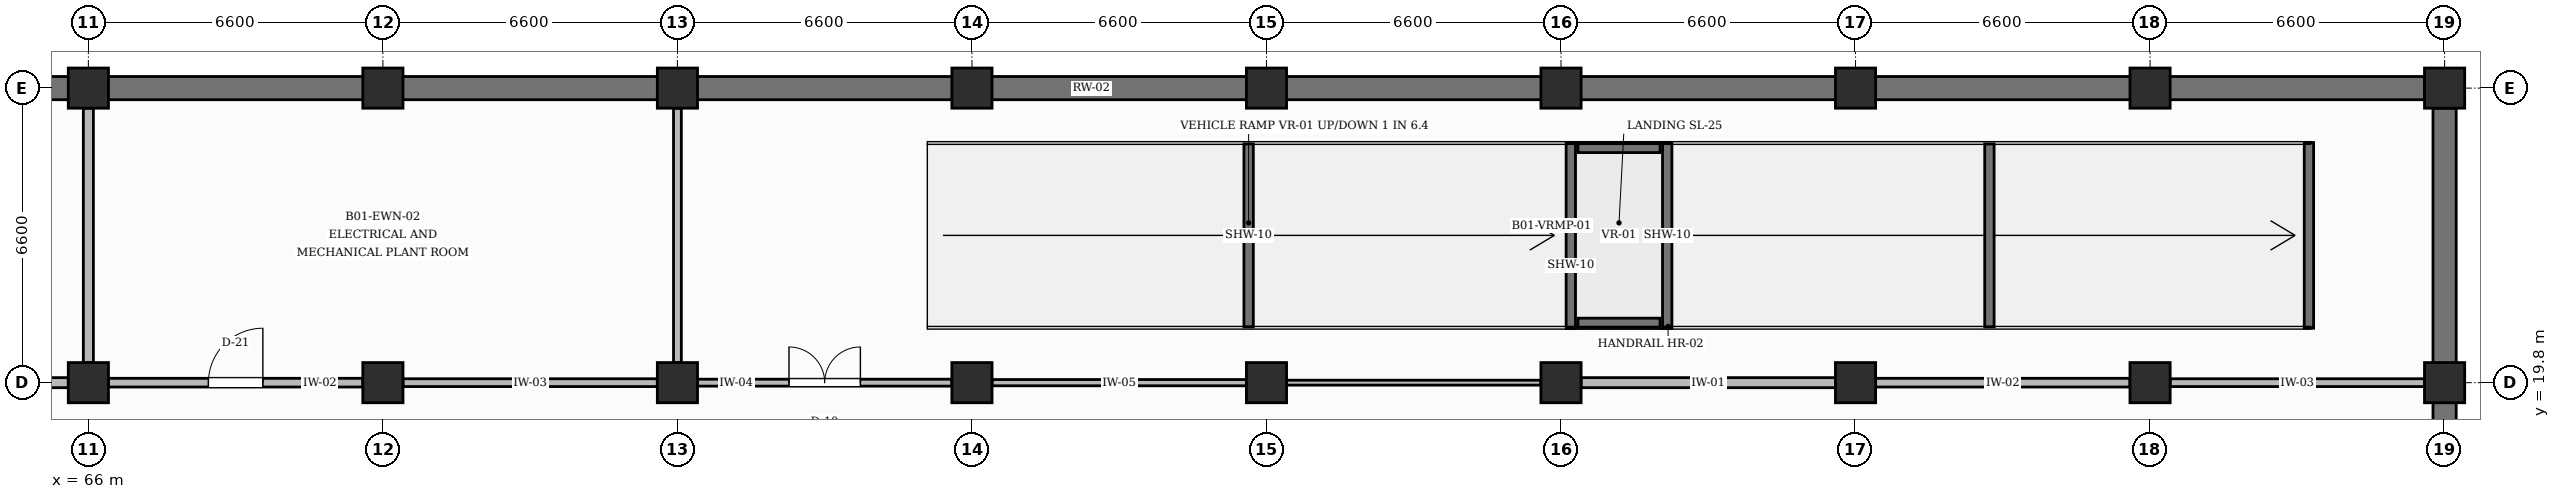
"""IFC4 building model, lengths in metres.
Left out: names, types, materials, properties, quantities, classifications, styles, units other than length and angle.
Written with IfcOpenShell. Run it as: python <this file> out.ifc"""

import sys

from ifc_helpers import new_model, si_unit, direction, frame, frame_2d, origin, origin_2d, place, context, subcontext, project, spatial, rectangle, extrude, element, fill, save


model = new_model("IFC4")
c1 = context("Model", 3, precision=1e-05, world=origin(), true_north=direction((0.0, 1.0)))
c2 = subcontext(c1, "Body", "Model", "MODEL_VIEW")
j1 = project(units=[si_unit("LENGTHUNIT", "METRE"), si_unit("PLANEANGLEUNIT", "RADIAN")], contexts=[c1])
p1 = place(None, origin())
s1 = spatial("IfcSite", under=j1, at=p1, CompositionType="ELEMENT")
p2 = place(p1, origin())
s2 = spatial("IfcBuilding", under=s1, at=p2, CompositionType="ELEMENT")
p3 = place(p2, frame((0.0, 0.0, -4.5)))
s3 = spatial("IfcBuildingStorey", under=s2, at=p3, CompositionType="ELEMENT", Elevation=-4.5)
for number, where, z_axis, x_axis in (
    (1, (66.0, 19.8, 0.0), (0.0, 0.0, 1.0), (1.0, 0.0, 0.0)),
    (2, (66.0, 26.4, 0.0), (0.0, 0.0, 1.0), (1.0, 0.0, 0.0)),
    (3, (72.6, 19.8, 0.0), (0.0, 0.0, 1.0), (1.0, 0.0, 0.0)),
    (4, (72.6, 26.4, 0.0), (0.0, 0.0, 1.0), (1.0, 0.0, 0.0)),
    (5, (79.2, 19.8, 0.0), (0.0, 0.0, 1.0), (1.0, 0.0, 0.0)),
    (6, (79.2, 26.4, 0.0), (0.0, 0.0, 1.0), (1.0, 0.0, 0.0)),
    (7, (85.8, 19.8, 0.0), (0.0, 0.0, 1.0), (1.0, 0.0, 0.0)),
    (8, (85.8, 26.4, 0.0), (0.0, 0.0, 1.0), (1.0, 0.0, 0.0)),
    (9, (92.4, 19.8, 0.0), (0.0, 0.0, 1.0), (1.0, 0.0, 0.0)),
    (10, (92.4, 26.4, 0.0), (0.0, 0.0, 1.0), (1.0, 0.0, 0.0)),
    (11, (99.0, 19.8, 0.0), (0.0, 0.0, 1.0), (1.0, 0.0, 0.0)),
    (12, (99.0, 26.4, 0.0), (0.0, 0.0, 1.0), (1.0, 0.0, 0.0)),
    (13, (105.6, 19.8, 0.0), (0.0, 0.0, 1.0), (1.0, 0.0, 0.0)),
    (14, (105.6, 26.4, 0.0), (0.0, 0.0, 1.0), (1.0, 0.0, 0.0)),
    (15, (112.2, 19.8, 0.0), (0.0, 0.0, 1.0), (1.0, 0.0, 0.0)),
    (16, (112.2, 26.4, 0.0), (0.0, 0.0, 1.0), (1.0, 0.0, 0.0)),
    (17, (118.8, 19.8, 0.0), (0.0, 0.0, 1.0), (1.0, 0.0, 0.0)),
    (18, (118.8, 26.4, 0.0), (0.0, 0.0, 1.0), (1.0, 0.0, 0.0)),
):
    element("IfcColumn", number, at=place(p3, frame(where, z_axis=z_axis, x_axis=x_axis)), inside=s3, PredefinedType="COLUMN", context=c2, shape_type="SweptSolid", body=[
        extrude(rectangle(XDim=0.9, YDim=0.9, at=origin_2d()), origin(), (0.0, 0.0, 1.0), 4.5),
    ])
for number, where, z_axis, x_axis in (
    (19, (99.22, 21.02, 0.0), (0.0, 0.0, 1.0), (0.0, 1.0, 0.0)),
    (20, (101.38, 21.02, 0.0), (0.0, 0.0, 1.0), (0.0, 1.0, 0.0)),
):
    element("IfcWall", number, at=place(p3, frame(where, z_axis=z_axis, x_axis=x_axis)), inside=s3, PredefinedType="SOLIDWALL", context=c2, shape_type="SweptSolid", body=[
        extrude(rectangle(XDim=4.16, YDim=0.21, at=frame_2d((2.08, 0.0))), origin(), (0.0, 0.0, 1.0), 2.065),
    ])
for number, where, z_axis, x_axis in (
    (21, (99.38, 21.14, 0.0), (0.0, 0.0, 1.0), (1.0, 0.0, 0.0)),
    (22, (99.38, 25.06, 0.0), (0.0, 0.0, 1.0), (1.0, 0.0, 0.0)),
):
    element("IfcWall", number, at=place(p3, frame(where, z_axis=z_axis, x_axis=x_axis)), inside=s3, PredefinedType="SOLIDWALL", context=c2, shape_type="SweptSolid", body=[
        extrude(rectangle(XDim=1.84, YDim=0.21, at=frame_2d((0.92, 0.0))), origin(), (0.0, 0.0, 1.0), 2.065),
    ])
p4 = place(p3, frame((92.0, 21.05, 0.0), z_axis=(0.0, 0.0, 1.0), x_axis=(0.0, 1.0, 0.0)))
e23 = element("IfcWall", 23, at=p4, inside=s3, PredefinedType="SOLIDWALL", context=c2, shape_type="SweptSolid", body=[
    extrude(rectangle(XDim=4.1, YDim=0.21, at=frame_2d((2.05, 0.0))), origin(), (0.0, 0.0, 1.0), 0.84),
])
p5 = place(p3, frame((108.6, 21.05, 0.0), z_axis=(0.0, 0.0, 1.0), x_axis=(0.0, 1.0, 0.0)))
e24 = element("IfcWall", 24, at=p5, inside=s3, PredefinedType="SOLIDWALL", context=c2, shape_type="SweptSolid", body=[
    extrude(rectangle(XDim=4.1, YDim=0.21, at=frame_2d((2.05, 0.0))), origin(), (0.0, 0.0, 1.0), 3.09),
])
p6 = place(p3, frame((115.76, 21.02, 0.0), z_axis=(0.0, 0.0, 1.0), x_axis=(0.0, 1.0, 0.0)))
e25 = element("IfcWall", 25, at=p6, inside=s3, PredefinedType="SOLIDWALL", context=c2, shape_type="SweptSolid", body=[
    extrude(rectangle(XDim=4.16, YDim=0.21, at=frame_2d((2.08, 0.0))), origin(), (0.0, 0.0, 1.0), 4.14),
])
for number, where, z_axis, x_axis in (
    (26, (59.85, 26.4, 0.0), (0.0, 0.0, 1.0), (1.0, 0.0, 0.0)),
    (27, (66.45, 26.4, 0.0), (0.0, 0.0, 1.0), (1.0, 0.0, 0.0)),
    (28, (73.05, 26.4, 0.0), (0.0, 0.0, 1.0), (1.0, 0.0, 0.0)),
):
    element("IfcWall", number, at=place(p3, frame(where, z_axis=z_axis, x_axis=x_axis)), inside=s3, PredefinedType="USERDEFINED", context=c2, shape_type="SweptSolid", body=[
        extrude(rectangle(XDim=5.7, YDim=0.52, at=frame_2d((2.85, 0.0))), origin(), (0.0, 0.0, 1.0), 3.49),
    ])
p7 = place(p3, frame((79.65, 26.4, 0.0), z_axis=(0.0, 0.0, 1.0), x_axis=(1.0, 0.0, 0.0)))
e29 = element("IfcWall", 29, at=p7, inside=s3, PredefinedType="USERDEFINED", context=c2, shape_type="SweptSolid", body=[
    extrude(rectangle(XDim=5.7, YDim=0.52, at=frame_2d((2.85, 0.0))), origin(), (0.0, 0.0, 1.0), 3.49),
])
for number, where, z_axis, x_axis in (
    (30, (86.25, 26.4, 0.0), (0.0, 0.0, 1.0), (1.0, 0.0, 0.0)),
    (31, (92.85, 26.4, 0.0), (0.0, 0.0, 1.0), (1.0, 0.0, 0.0)),
    (32, (99.45, 26.4, 0.0), (0.0, 0.0, 1.0), (1.0, 0.0, 0.0)),
    (33, (106.05, 26.4, 0.0), (0.0, 0.0, 1.0), (1.0, 0.0, 0.0)),
):
    element("IfcWall", number, at=place(p3, frame(where, z_axis=z_axis, x_axis=x_axis)), inside=s3, PredefinedType="USERDEFINED", context=c2, shape_type="SweptSolid", body=[
        extrude(rectangle(XDim=5.7, YDim=0.52, at=frame_2d((2.85, 0.0))), origin(), (0.0, 0.0, 1.0), 3.49),
    ])
for number, where, z_axis, x_axis in (
    (34, (118.8, 13.65, 0.0), (0.0, 0.0, 1.0), (0.0, 1.0, 0.0)),
    (35, (112.65, 26.4, 0.0), (0.0, 0.0, 1.0), (1.0, 0.0, 0.0)),
):
    element("IfcWall", number, at=place(p3, frame(where, z_axis=z_axis, x_axis=x_axis)), inside=s3, PredefinedType="USERDEFINED", context=c2, shape_type="SweptSolid", body=[
        extrude(rectangle(XDim=5.7, YDim=0.52, at=frame_2d((2.85, 0.0))), origin(), (0.0, 0.0, 1.0), 3.49),
    ])
p8 = place(p3, frame((118.8, 20.25, 0.0), z_axis=(0.0, 0.0, 1.0), x_axis=(0.0, 1.0, 0.0)))
e36 = element("IfcWall", 36, at=p8, inside=s3, PredefinedType="USERDEFINED", context=c2, shape_type="SweptSolid", body=[
    extrude(rectangle(XDim=5.7, YDim=0.52, at=frame_2d((2.85, 0.0))), origin(), (0.0, 0.0, 1.0), 3.49),
])
p9 = place(p3, frame((59.85, 19.8, 0.0), z_axis=(0.0, 0.0, 1.0), x_axis=(1.0, 0.0, 0.0)))
e37 = element("IfcWall", 37, at=p9, inside=s3, PredefinedType="PARTITIONING", context=c2, shape_type="SweptSolid", body=[
    extrude(rectangle(XDim=5.7, YDim=0.225, at=frame_2d((2.85, 0.0))), origin(), (0.0, 0.0, 1.0), 3.24),
])
p10 = place(p3, frame((66.0, 20.25, 0.0), z_axis=(0.0, 0.0, 1.0), x_axis=(0.0, 1.0, 0.0)))
e38 = element("IfcWall", 38, at=p10, inside=s3, PredefinedType="PARTITIONING", context=c2, shape_type="SweptSolid", body=[
    extrude(rectangle(XDim=5.7, YDim=0.225, at=frame_2d((2.85, 0.0))), origin(), (0.0, 0.0, 1.0), 3.34),
])
p11 = place(p3, frame((66.45, 19.8, 0.0), z_axis=(0.0, 0.0, 1.0), x_axis=(1.0, 0.0, 0.0)))
e39 = element("IfcWall", 39, at=p11, inside=s3, PredefinedType="PARTITIONING", context=c2, shape_type="SweptSolid", body=[
    extrude(rectangle(XDim=5.7, YDim=0.195, at=frame_2d((2.85, 0.0))), origin(), (0.0, 0.0, 1.0), 3.34),
])
p12 = place(p11, frame((2.24, 0.0, 0.0)))
e40 = element("IfcOpeningElement", 40, at=p12, cuts=e39, PredefinedType="OPENING", context=c2, shape_type="SweptSolid", body=[
    extrude(rectangle(XDim=1.22, YDim=2.15, at=frame_2d((0.61, 1.075))), frame((0.0, 0.107, 0.0), z_axis=(0.0, -1.0, 0.0), x_axis=(1.0, 0.0, 0.0)), (0.0, 0.0, 1.0), 0.215),
])
p13 = place(p3, frame((73.05, 19.8, 0.0), z_axis=(0.0, 0.0, 1.0), x_axis=(1.0, 0.0, 0.0)))
e41 = element("IfcWall", 41, at=p13, inside=s3, PredefinedType="PARTITIONING", context=c2, shape_type="SweptSolid", body=[
    extrude(rectangle(XDim=5.7, YDim=0.175, at=frame_2d((2.85, 0.0))), origin(), (0.0, 0.0, 1.0), 3.24),
])
p14 = place(p3, frame((79.2, 20.25, 0.0), z_axis=(0.0, 0.0, 1.0), x_axis=(0.0, 1.0, 0.0)))
e42 = element("IfcWall", 42, at=p14, inside=s3, PredefinedType="PARTITIONING", context=c2, shape_type="SweptSolid", body=[
    extrude(rectangle(XDim=5.7, YDim=0.175, at=frame_2d((2.85, 0.0))), origin(), (0.0, 0.0, 1.0), 3.34),
])
p15 = place(p3, frame((79.65, 19.8, 0.0), z_axis=(0.0, 0.0, 1.0), x_axis=(1.0, 0.0, 0.0)))
e43 = element("IfcWall", 43, at=p15, inside=s3, PredefinedType="PARTITIONING", context=c2, shape_type="SweptSolid", body=[
    extrude(rectangle(XDim=5.7, YDim=0.155, at=frame_2d((2.85, 0.0))), origin(), (0.0, 0.0, 1.0), 3.34),
])
p16 = place(p15, frame((2.05, 0.0, 0.0)))
e44 = element("IfcOpeningElement", 44, at=p16, cuts=e43, PredefinedType="OPENING", context=c2, shape_type="SweptSolid", body=[
    extrude(rectangle(XDim=1.6, YDim=2.2, at=frame_2d((0.8, 1.1))), frame((0.0, 0.087, 0.0), z_axis=(0.0, -1.0, 0.0), x_axis=(1.0, 0.0, 0.0)), (0.0, 0.0, 1.0), 0.175),
])
p17 = place(p3, frame((86.25, 19.8, 0.0), z_axis=(0.0, 0.0, 1.0), x_axis=(1.0, 0.0, 0.0)))
e45 = element("IfcWall", 45, at=p17, inside=s3, PredefinedType="PARTITIONING", context=c2, shape_type="SweptSolid", body=[
    extrude(rectangle(XDim=5.7, YDim=0.14, at=frame_2d((2.85, 0.0))), origin(), (0.0, 0.0, 1.0), 3.24),
])
p18 = place(p3, frame((92.85, 19.8, 0.0), z_axis=(0.0, 0.0, 1.0), x_axis=(1.0, 0.0, 0.0)))
e46 = element("IfcWall", 46, at=p18, inside=s3, PredefinedType="PARTITIONING", context=c2, shape_type="SweptSolid", body=[
    extrude(rectangle(XDim=5.7, YDim=0.11, at=frame_2d((2.85, 0.0))), origin(), (0.0, 0.0, 1.0), 3.34),
])
p19 = place(p3, frame((99.45, 19.8, 0.0), z_axis=(0.0, 0.0, 1.0), x_axis=(1.0, 0.0, 0.0)))
e47 = element("IfcWall", 47, at=p19, inside=s3, PredefinedType="PARTITIONING", context=c2, shape_type="SweptSolid", body=[
    extrude(rectangle(XDim=5.7, YDim=0.225, at=frame_2d((2.85, 0.0))), origin(), (0.0, 0.0, 1.0), 3.24),
])
p20 = place(p3, frame((106.05, 19.8, 0.0), z_axis=(0.0, 0.0, 1.0), x_axis=(1.0, 0.0, 0.0)))
e48 = element("IfcWall", 48, at=p20, inside=s3, PredefinedType="PARTITIONING", context=c2, shape_type="SweptSolid", body=[
    extrude(rectangle(XDim=5.7, YDim=0.195, at=frame_2d((2.85, 0.0))), origin(), (0.0, 0.0, 1.0), 3.34),
])
p21 = place(p3, frame((112.65, 19.8, 0.0), z_axis=(0.0, 0.0, 1.0), x_axis=(1.0, 0.0, 0.0)))
e49 = element("IfcWall", 49, at=p21, inside=s3, PredefinedType="PARTITIONING", context=c2, shape_type="SweptSolid", body=[
    extrude(rectangle(XDim=5.7, YDim=0.175, at=frame_2d((2.85, 0.0))), origin(), (0.0, 0.0, 1.0), 3.24),
])
p22 = place(p16, origin())
e50 = element("IfcDoor", 50, at=p22, inside=s3, OperationType="DOUBLE_DOOR_SINGLE_SWING", PredefinedType="DOOR", context=c2, shape_type="SweptSolid", body=[
    extrude(rectangle(XDim=1.6, YDim=2.2, at=frame_2d((0.8, 1.1))), frame((0.0, 0.025, 0.0), z_axis=(0.0, -1.0, 0.0), x_axis=(1.0, 0.0, 0.0)), (0.0, 0.0, 1.0), 0.05),
])
fill(e44, e50)
p23 = place(p12, origin())
e51 = element("IfcDoor", 51, at=p23, inside=s3, OperationType="SINGLE_SWING_RIGHT", PredefinedType="DOOR", context=c2, shape_type="SweptSolid", body=[
    extrude(rectangle(XDim=1.22, YDim=2.15, at=frame_2d((0.61, 1.075))), frame((0.0, 0.025, 0.0), z_axis=(0.0, -1.0, 0.0), x_axis=(1.0, 0.0, 0.0)), (0.0, 0.0, 1.0), 0.05),
])
fill(e40, e51)
save(model, sys.argv[1])
